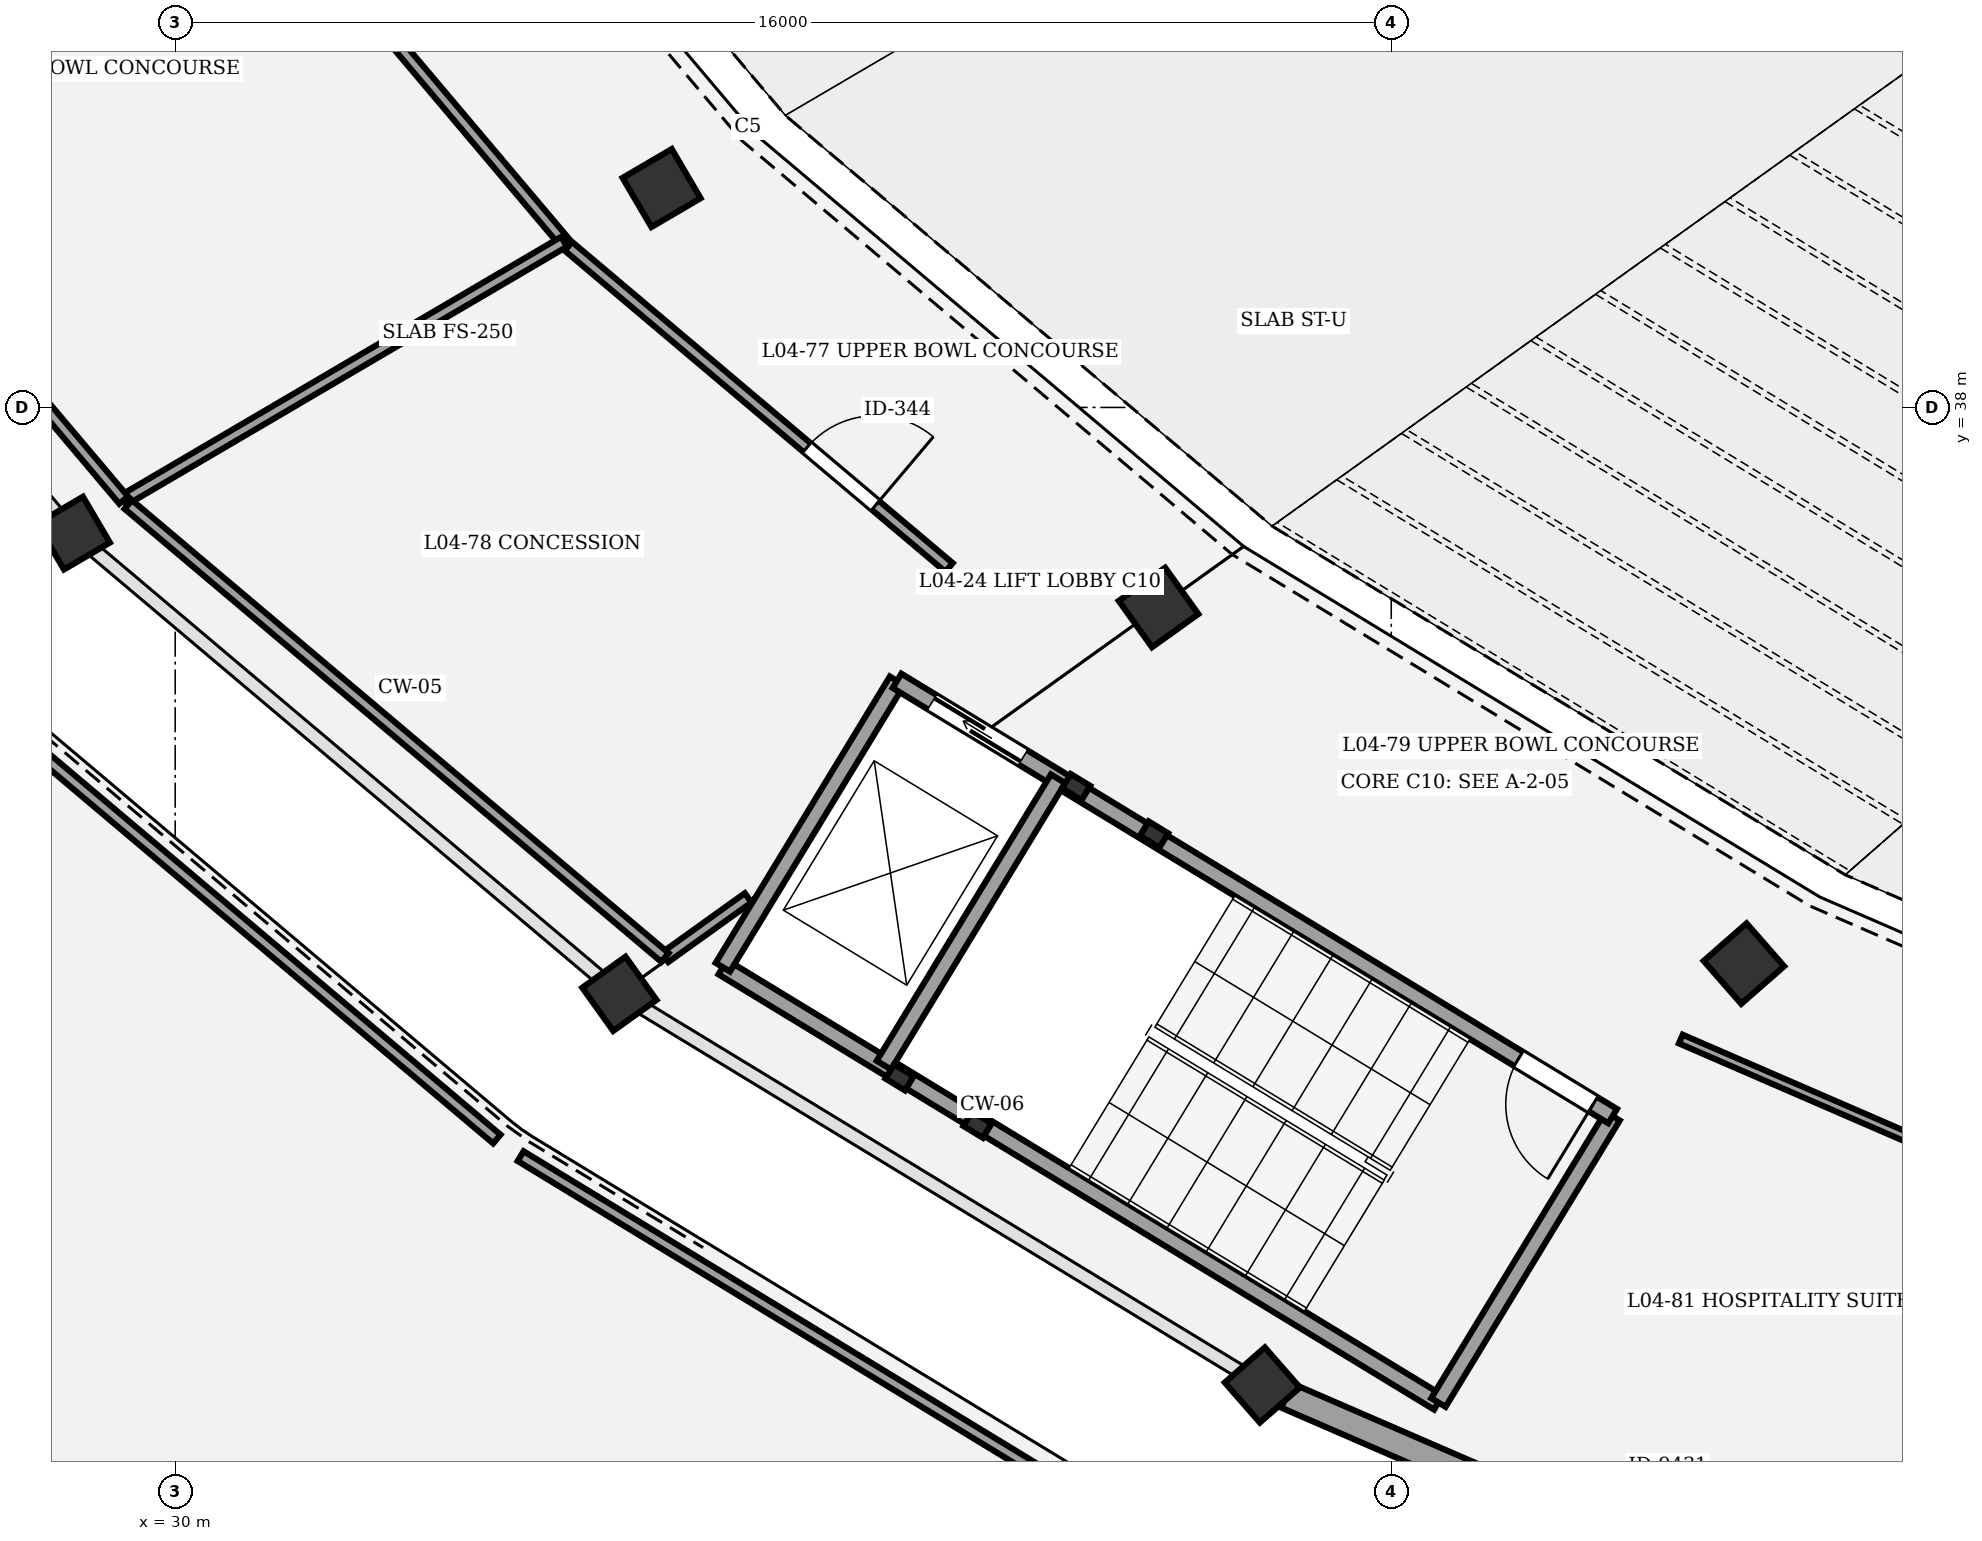
"""IFC4 building model, lengths in metres.
Left out: names, types, materials, properties, quantities, classifications, styles, units other than length and angle.
Written with IfcOpenShell. Run it as: python <this file> out.ifc"""

import sys

from ifc_helpers import new_model, si_unit, direction, frame, frame_2d, origin, origin_2d, place, context, subcontext, project, spatial, rectangle, extrude, element, fill, save


model = new_model("IFC4")
c1 = context("Model", 3, precision=1e-05, world=origin(), true_north=direction((0.0, 1.0)))
c2 = subcontext(c1, "Body", "Model", "MODEL_VIEW")
j1 = project(units=[si_unit("LENGTHUNIT", "METRE"), si_unit("PLANEANGLEUNIT", "RADIAN")], contexts=[c1])
p1 = place(None, origin())
s1 = spatial("IfcSite", under=j1, at=p1, CompositionType="ELEMENT")
p2 = place(p1, origin())
s2 = spatial("IfcBuilding", under=s1, at=p2, CompositionType="ELEMENT")
p3 = place(p2, frame((0.0, 0.0, 19.2)))
s3 = spatial("IfcBuildingStorey", under=s2, at=p3, CompositionType="ELEMENT", Elevation=19.2)
p4 = place(p3, frame((36.4, 40.886, 0.0), z_axis=(0.0, 0.0, 1.0), x_axis=(-0.862513669207, -0.506033764121, 0.0)))
e1 = element("IfcColumn", 1, at=p4, inside=s3, PredefinedType="COLUMN", context=c2, shape_type="SweptSolid", body=[
    extrude(rectangle(XDim=0.75, YDim=0.75, at=origin_2d()), origin(), (0.0, 0.0, 1.0), 4.8),
])
p5 = place(p3, frame((28.662, 36.346, 0.0), z_axis=(0.0, 0.0, 1.0), x_axis=(-0.862513669207, -0.506033764121, 0.0)))
e2 = element("IfcColumn", 2, at=p5, inside=s3, PredefinedType="COLUMN", context=c2, shape_type="SweptSolid", body=[
    extrude(rectangle(XDim=0.7, YDim=0.7, at=origin_2d()), origin(), (0.0, 0.0, 1.0), 4.8),
])
p6 = place(p3, frame((42.939, 35.368, 0.0), z_axis=(0.0, 0.0, 1.0), x_axis=(-0.812897512265, -0.582406760395, 0.0)))
e3 = element("IfcColumn", 3, at=p6, inside=s3, PredefinedType="COLUMN", context=c2, shape_type="SweptSolid", body=[
    extrude(rectangle(XDim=0.75, YDim=0.75, at=origin_2d()), origin(), (0.0, 0.0, 1.0), 4.8),
])
p7 = place(p3, frame((35.844, 30.285, 0.0), z_axis=(0.0, 0.0, 1.0), x_axis=(-0.812897512265, -0.582406760395, 0.0)))
e4 = element("IfcColumn", 4, at=p7, inside=s3, PredefinedType="COLUMN", context=c2, shape_type="SweptSolid", body=[
    extrude(rectangle(XDim=0.7, YDim=0.7, at=origin_2d()), origin(), (0.0, 0.0, 1.0), 4.8),
])
p8 = place(p3, frame((50.64, 30.683, 0.0), z_axis=(0.0, 0.0, 1.0), x_axis=(-0.752529860433, -0.658558128912, 0.0)))
e5 = element("IfcColumn", 5, at=p8, inside=s3, PredefinedType="COLUMN", context=c2, shape_type="SweptSolid", body=[
    extrude(rectangle(XDim=0.75, YDim=0.75, at=origin_2d()), origin(), (0.0, 0.0, 1.0), 4.8),
])
p9 = place(p3, frame((44.304, 25.139, 0.0), z_axis=(0.0, 0.0, 1.0), x_axis=(-0.752529860433, -0.658558128912, 0.0)))
e6 = element("IfcColumn", 6, at=p9, inside=s3, PredefinedType="COLUMN", context=c2, shape_type="SweptSolid", body=[
    extrude(rectangle(XDim=0.7, YDim=0.7, at=origin_2d()), origin(), (0.0, 0.0, 1.0), 4.8),
])
p10 = place(p3, frame((53.743, 21.047, 0.0), z_axis=(0.0, 0.0, 1.0), x_axis=(-0.917498268626, 0.397739773052, 0.0)))
e7 = element("IfcWall", 7, at=p10, inside=s3, PredefinedType="STANDARD", context=c2, shape_type="SweptSolid", body=[
    extrude(rectangle(XDim=9.94, YDim=0.35, at=frame_2d((4.97, 0.0))), origin(), (0.0, 0.0, 1.0), 3.57),
])
p11 = place(p10, frame((4.07, 0.0, 0.0)))
e8 = element("IfcOpeningElement", 8, at=p11, cuts=e7, PredefinedType="OPENING", context=c2, shape_type="SweptSolid", body=[
    extrude(rectangle(XDim=1.8, YDim=2.4, at=frame_2d((0.9, 1.2))), frame((0.0, 0.185, 0.0), z_axis=(0.0, -1.0, 0.0), x_axis=(1.0, 0.0, 0.0)), (0.0, 0.0, 1.0), 0.37),
])
for number, where, z_axis, x_axis in (
    (9, (42.879, 32.382, 0.0), (0.0, 0.0, 1.0), (-0.854, 0.52, 0.0)),
    (10, (41.854, 33.005, 0.0), (0.0, 0.0, 1.0), (-0.854, 0.52, 0.0)),
    (11, (39.531, 29.186, 0.0), (0.0, 0.0, 1.0), (-0.854, 0.52, 0.0)),
    (12, (40.556, 28.562, 0.0), (0.0, 0.0, 1.0), (-0.854, 0.52, 0.0)),
):
    element("IfcColumn", number, at=place(p3, frame(where, z_axis=z_axis, x_axis=x_axis)), inside=s3, PredefinedType="COLUMN", context=c2, shape_type="SweptSolid", body=[
        extrude(rectangle(XDim=0.3, YDim=0.22, at=origin_2d()), origin(), (0.0, 0.0, 1.0), 4.8),
    ])
p12 = place(p3, frame((46.621, 24.909, 0.0), z_axis=(0.0, 0.0, 1.0), x_axis=(-0.854373055797, 0.519660159651, 0.0)))
e13 = element("IfcWall", 13, at=p12, inside=s3, PredefinedType="SHEAR", context=c2, shape_type="SweptSolid", body=[
    extrude(rectangle(XDim=11.02, YDim=0.22, at=frame_2d((5.51, 0.0))), origin(), (0.0, 0.0, 1.0), 4.55),
])
p13 = place(p3, frame((48.913, 28.677, 0.0), z_axis=(0.0, 0.0, 1.0), x_axis=(-0.519729151243, -0.854331088834, 0.0)))
e14 = element("IfcWall", 14, at=p13, inside=s3, PredefinedType="SHEAR", context=c2, shape_type="SweptSolid", body=[
    extrude(rectangle(XDim=4.41, YDim=0.22, at=frame_2d((2.205, 0.0))), origin(), (0.0, 0.0, 1.0), 4.55),
])
p14 = place(p3, frame((39.497, 34.403, 0.0), z_axis=(0.0, 0.0, 1.0), x_axis=(-0.519664162523, -0.854370621095, 0.0)))
e15 = element("IfcWall", 15, at=p14, inside=s3, PredefinedType="SHEAR", context=c2, shape_type="SweptSolid", body=[
    extrude(rectangle(XDim=4.41, YDim=0.22, at=frame_2d((2.205, 0.0))), origin(), (0.0, 0.0, 1.0), 4.55),
])
p15 = place(p3, frame((48.913, 28.677, 0.0), z_axis=(0.0, 0.0, 1.0), x_axis=(-0.854369202373, 0.51966649501, 0.0)))
e16 = element("IfcWall", 16, at=p15, inside=s3, PredefinedType="SHEAR", context=c2, shape_type="SweptSolid", body=[
    extrude(rectangle(XDim=11.02, YDim=0.22, at=frame_2d((5.51, 0.0))), origin(), (0.0, 0.0, 1.0), 4.55),
])
p16 = place(p15, frame((0.3, 0.0, 0.0)))
e17 = element("IfcOpeningElement", 17, at=p16, cuts=e16, PredefinedType="OPENING", context=c2, shape_type="SweptSolid", body=[
    extrude(rectangle(XDim=1.15, YDim=2.15, at=frame_2d((0.575, 1.075))), frame((0.0, 0.12, 0.0), z_axis=(0.0, -1.0, 0.0), x_axis=(1.0, 0.0, 0.0)), (0.0, 0.0, 1.0), 0.24),
])
p17 = place(p15, frame((9.08, 0.0, 0.0)))
e18 = element("IfcOpeningElement", 18, at=p17, cuts=e16, PredefinedType="OPENING", context=c2, shape_type="SweptSolid", body=[
    extrude(rectangle(XDim=1.4, YDim=2.25, at=frame_2d((0.7, 1.125))), frame((0.0, 0.12, 0.0), z_axis=(0.0, -1.0, 0.0), x_axis=(1.0, 0.0, 0.0)), (0.0, 0.0, 1.0), 0.24),
])
p18 = place(p3, frame((41.616, 33.115, 0.0), z_axis=(0.0, 0.0, 1.0), x_axis=(-0.519664162523, -0.854370621095, 0.0)))
e19 = element("IfcWall", 19, at=p18, inside=s3, PredefinedType="SHEAR", context=c2, shape_type="SweptSolid", body=[
    extrude(rectangle(XDim=4.41, YDim=0.22, at=frame_2d((2.205, 0.0))), origin(), (0.0, 0.0, 1.0), 4.55),
])
p19 = place(p3, frame((29.708, 46.584, 0.0), z_axis=(0.0, 0.0, 1.0), x_axis=(0.645175528474, -0.764034382379, 0.0)))
e20 = element("IfcWall", 20, at=p19, inside=s3, PredefinedType="PARTITIONING", context=c2, shape_type="SweptSolid", body=[
    extrude(rectangle(XDim=8.383, YDim=0.15, at=frame_2d((4.191, 0.0))), origin(), (0.0, 0.0, 1.0), 3.55),
])
p20 = place(p19, frame((3.621, 0.0, 0.0)))
e21 = element("IfcOpeningElement", 21, at=p20, cuts=e20, PredefinedType="OPENING", context=c2, shape_type="SweptSolid", body=[
    extrude(rectangle(XDim=1.14, YDim=2.2, at=frame_2d((0.57, 1.1))), frame((0.0, 0.085, 0.0), z_axis=(0.0, -1.0, 0.0), x_axis=(1.0, 0.0, 0.0)), (0.0, 0.0, 1.0), 0.17),
])
p21 = place(p3, frame((35.174, 40.121, 0.0), z_axis=(0.0, 0.0, 1.0), x_axis=(0.764267382471, -0.644899502319, 0.0)))
e22 = element("IfcWall", 22, at=p21, inside=s3, PredefinedType="PARTITIONING", context=c2, shape_type="SweptSolid", body=[
    extrude(rectangle(XDim=6.553, YDim=0.15, at=frame_2d((3.276, 0.0))), origin(), (0.0, 0.0, 1.0), 3.55),
])
p22 = place(p21, frame((4.106, 0.0, 0.0)))
e23 = element("IfcOpeningElement", 23, at=p22, cuts=e22, PredefinedType="OPENING", context=c2, shape_type="SweptSolid", body=[
    extrude(rectangle(XDim=1.18, YDim=2.2, at=frame_2d((0.59, 1.1))), frame((0.0, 0.085, 0.0), z_axis=(0.0, -1.0, 0.0), x_axis=(1.0, 0.0, 0.0)), (0.0, 0.0, 1.0), 0.17),
])
p23 = place(p3, frame((49.81, 29.69, 0.0), z_axis=(0.0, 0.0, 1.0), x_axis=(0.917512204383, -0.397707624779, 0.0)))
e24 = element("IfcWall", 24, at=p23, inside=s3, PredefinedType="PARTITIONING", context=c2, shape_type="SweptSolid", body=[
    extrude(rectangle(XDim=9.574, YDim=0.125, at=frame_2d((4.787, 0.0))), origin(), (0.0, 0.0, 1.0), 3.55),
])
p24 = place(p23, frame((4.177, 0.0, 0.0)))
e25 = element("IfcOpeningElement", 25, at=p24, cuts=e24, PredefinedType="OPENING", context=c2, shape_type="SweptSolid", body=[
    extrude(rectangle(XDim=1.22, YDim=2.2, at=frame_2d((0.61, 1.1))), frame((0.0, 0.073, 0.0), z_axis=(0.0, -1.0, 0.0), x_axis=(1.0, 0.0, 0.0)), (0.0, 0.0, 1.0), 0.145),
])
p25 = place(p3, frame((35.117, 40.18, 0.0), z_axis=(0.0, 0.0, 1.0), x_axis=(-0.862533364667, -0.506000192527, 0.0)))
e26 = element("IfcWall", 26, at=p25, inside=s3, PredefinedType="PARTITIONING", context=c2, shape_type="SweptSolid", body=[
    extrude(rectangle(XDim=6.718, YDim=0.15, at=frame_2d((3.359, 0.0))), origin(), (0.0, 0.0, 1.0), 3.55),
])
p26 = place(p3, frame((29.322, 36.781, 0.0), z_axis=(0.0, 0.0, 1.0), x_axis=(-0.645159696095, 0.764047751475, 0.0)))
e27 = element("IfcWall", 27, at=p26, inside=s3, PredefinedType="PARTITIONING", context=c2, shape_type="SweptSolid", body=[
    extrude(rectangle(XDim=8.997, YDim=0.15, at=frame_2d((4.498, 0.0))), origin(), (0.0, 0.0, 1.0), 3.55),
])
p27 = place(p3, frame((37.538, 31.548, 0.0), z_axis=(0.0, 0.0, 1.0), x_axis=(-0.81288723642, -0.582421102695, 0.0)))
e28 = element("IfcWall", 28, at=p27, inside=s3, PredefinedType="PARTITIONING", context=c2, shape_type="SweptSolid", body=[
    extrude(rectangle(XDim=1.346, YDim=0.15, at=frame_2d((0.673, 0.0))), origin(), (0.0, 0.0, 1.0), 3.55),
])
p28 = place(p3, frame((36.444, 30.764, 0.0), z_axis=(0.0, 0.0, 1.0), x_axis=(-0.764260552728, 0.644907596129, 0.0)))
e29 = element("IfcWall", 29, at=p28, inside=s3, PredefinedType="PARTITIONING", context=c2, shape_type="SweptSolid", body=[
    extrude(rectangle(XDim=9.24, YDim=0.15, at=frame_2d((4.62, 0.0))), origin(), (0.0, 0.0, 1.0), 3.55),
])
p29 = place(p3, frame((27.049, 34.436, 0.0), z_axis=(0.0, 0.0, 1.0), x_axis=(0.76426547638, -0.644901761212, 0.0)))
e30 = element("IfcWall", 30, at=p29, inside=s3, PredefinedType="PARTITIONING", context=c2, shape_type="SweptSolid", body=[
    extrude(rectangle(XDim=9.398, YDim=0.15, at=frame_2d((4.699, 0.0))), origin(), (0.0, 0.0, 1.0), 3.55),
])
p30 = place(p3, frame((34.545, 28.15, 0.0), z_axis=(0.0, 0.0, 1.0), x_axis=(0.854333268174, -0.519725568826, 0.0)))
e31 = element("IfcWall", 31, at=p30, inside=s3, PredefinedType="PARTITIONING", context=c2, shape_type="SweptSolid", body=[
    extrude(rectangle(XDim=9.902, YDim=0.15, at=frame_2d((4.951, 0.0))), origin(), (0.0, 0.0, 1.0), 3.55),
])
p31 = place(p16, origin())
e32 = element("IfcDoor", 32, at=p31, inside=s3, OperationType="SINGLE_SWING_LEFT", PredefinedType="DOOR", context=c2, shape_type="SweptSolid", body=[
    extrude(rectangle(XDim=1.15, YDim=2.15, at=frame_2d((0.575, 1.075))), frame((0.0, 0.025, 0.0), z_axis=(0.0, -1.0, 0.0), x_axis=(1.0, 0.0, 0.0)), (0.0, 0.0, 1.0), 0.05),
])
fill(e17, e32)
p32 = place(p17, origin())
e33 = element("IfcDoor", 33, at=p32, inside=s3, OperationType="DOUBLE_DOOR_SLIDING", PredefinedType="DOOR", context=c2, shape_type="SweptSolid", body=[
    extrude(rectangle(XDim=1.4, YDim=2.25, at=frame_2d((0.7, 1.125))), frame((0.0, 0.025, 0.0), z_axis=(0.0, -1.0, 0.0), x_axis=(1.0, 0.0, 0.0)), (0.0, 0.0, 1.0), 0.05),
])
fill(e18, e33)
p33 = place(p22, origin())
e34 = element("IfcDoor", 34, at=p33, inside=s3, OperationType="SINGLE_SWING_RIGHT", PredefinedType="DOOR", context=c2, shape_type="SweptSolid", body=[
    extrude(rectangle(XDim=1.18, YDim=2.2, at=frame_2d((0.59, 1.1))), frame((0.0, 0.025, 0.0), z_axis=(0.0, -1.0, 0.0), x_axis=(1.0, 0.0, 0.0)), (0.0, 0.0, 1.0), 0.05),
])
fill(e23, e34)
save(model, sys.argv[1])
